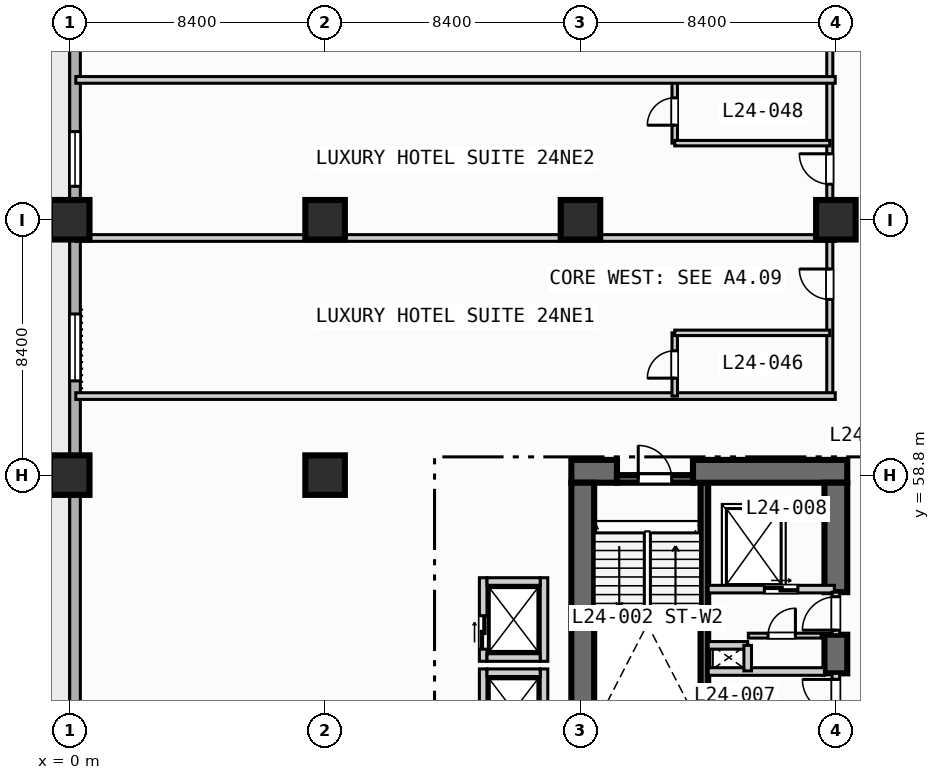
"""IFC4 building model, lengths in metres.
Left out: names, types, materials, properties, quantities, classifications, styles, units other than length and angle.
Written with IfcOpenShell. Run it as: python <this file> out.ifc"""

import sys

from ifc_helpers import new_model, si_unit, direction, frame, frame_2d, origin, origin_2d, place, context, subcontext, project, spatial, rectangle, extrude, element, fill, save


model = new_model("IFC4")
c1 = context("Model", 3, precision=1e-05, world=origin(), true_north=direction((0.0, 1.0)))
c2 = subcontext(c1, "Body", "Model", "MODEL_VIEW")
j1 = project(units=[si_unit("LENGTHUNIT", "METRE"), si_unit("PLANEANGLEUNIT", "RADIAN")], contexts=[c1])
p1 = place(None, origin())
s1 = spatial("IfcSite", under=j1, at=p1, CompositionType="ELEMENT")
p2 = place(p1, origin())
s2 = spatial("IfcBuilding", under=s1, at=p2, CompositionType="ELEMENT")
p3 = place(p2, frame((0.0, 0.0, 103.8)))
s3 = spatial("IfcBuildingStorey", under=s2, at=p3, CompositionType="ELEMENT", Elevation=103.8)
p4 = place(p3, frame((20.875, 50.5, 0.0), z_axis=(0.0, 0.0, 1.0), x_axis=(0.0, 1.0, 0.0)))
e1 = element("IfcWall", 1, at=p4, inside=s3, PredefinedType="SOLIDWALL", context=c2, shape_type="SweptSolid", body=[
    extrude(rectangle(XDim=8.05, YDim=0.25, at=frame_2d((4.025, 0.0))), origin(), (0.0, 0.0, 1.0), 3.55),
])
p5 = place(p3, frame((16.5, 58.925, 0.0), z_axis=(0.0, 0.0, 1.0), x_axis=(1.0, 0.0, 0.0)))
e2 = element("IfcWall", 2, at=p5, inside=s3, PredefinedType="SHEAR", context=c2, shape_type="SweptSolid", body=[
    extrude(rectangle(XDim=1.5, YDim=0.75, at=frame_2d((0.75, 0.0))), origin(), (0.0, 0.0, 1.0), 3.55),
])
p6 = place(p3, frame((20.5, 58.925, 0.0), z_axis=(0.0, 0.0, 1.0), x_axis=(1.0, 0.0, 0.0)))
e3 = element("IfcWall", 3, at=p6, inside=s3, PredefinedType="SHEAR", context=c2, shape_type="SweptSolid", body=[
    extrude(rectangle(XDim=5.075, YDim=0.75, at=frame_2d((2.538, 0.0))), origin(), (0.0, 0.0, 1.0), 3.55),
])
p7 = place(p3, frame((16.875, 42.2, 0.0), z_axis=(0.0, 0.0, 1.0), x_axis=(0.0, 1.0, 0.0)))
e4 = element("IfcWall", 4, at=p7, inside=s3, PredefinedType="SHEAR", context=c2, shape_type="SweptSolid", body=[
    extrude(rectangle(XDim=16.35, YDim=0.75, at=frame_2d((8.175, 0.0))), origin(), (0.0, 0.0, 1.0), 3.55),
])
p8 = place(p3, frame((25.2, 52.28, 0.0), z_axis=(0.0, 0.0, 1.0), x_axis=(0.0, 1.0, 0.0)))
e5 = element("IfcWall", 5, at=p8, inside=s3, PredefinedType="SHEAR", context=c2, shape_type="SweptSolid", body=[
    extrude(rectangle(XDim=1.27, YDim=0.75, at=frame_2d((0.635, 0.0))), origin(), (0.0, 0.0, 1.0), 3.55),
])
p9 = place(p3, frame((25.2, 54.95, 0.0), z_axis=(0.0, 0.0, 1.0), x_axis=(0.0, 1.0, 0.0)))
e6 = element("IfcWall", 6, at=p9, inside=s3, PredefinedType="SHEAR", context=c2, shape_type="SweptSolid", body=[
    extrude(rectangle(XDim=3.6, YDim=0.75, at=frame_2d((1.8, 0.0))), origin(), (0.0, 0.0, 1.0), 3.55),
])
for number, where, z_axis, x_axis in (
    (7, (0.0, 58.8, 0.0), (0.0, 0.0, 1.0), (1.0, 0.0, 0.0)),
    (8, (0.0, 67.2, 0.0), (0.0, 0.0, 1.0), (1.0, 0.0, 0.0)),
    (9, (8.4, 58.8, 0.0), (0.0, 0.0, 1.0), (1.0, 0.0, 0.0)),
    (10, (8.4, 67.2, 0.0), (0.0, 0.0, 1.0), (1.0, 0.0, 0.0)),
    (11, (16.8, 67.2, 0.0), (0.0, 0.0, 1.0), (1.0, 0.0, 0.0)),
    (12, (25.2, 67.2, 0.0), (0.0, 0.0, 1.0), (1.0, 0.0, 0.0)),
):
    element("IfcColumn", number, at=place(p3, frame(where, z_axis=z_axis, x_axis=x_axis)), inside=s3, PredefinedType="COLUMN", context=c2, shape_type="SweptSolid", body=[
        extrude(rectangle(XDim=1.3, YDim=1.3, at=origin_2d()), origin(), (0.0, 0.0, 1.0), 3.8),
    ])
p10 = place(p3, frame((0.175, 3.175, 0.0), z_axis=(0.0, 0.0, 1.0), x_axis=(0.0, 1.0, 0.0)))
e13 = element("IfcWall", 13, at=p10, inside=s3, PredefinedType="STANDARD", context=c2, shape_type="SweptSolid", body=[
    extrude(rectangle(XDim=86.05, YDim=0.35, at=frame_2d((43.025, 0.0))), origin(), (0.0, 0.0, 1.0), 3.55),
])
p11 = place(p10, frame((42.325, 0.0, 0.0)))
e14 = element("IfcOpeningElement", 14, at=p11, cuts=e13, PredefinedType="OPENING", context=c2, shape_type="SweptSolid", body=[
    extrude(rectangle(XDim=1.4, YDim=2.2, at=frame_2d((0.7, 1.1))), frame((0.0, 0.185, 0.0), z_axis=(0.0, -1.0, 0.0), x_axis=(1.0, 0.0, 0.0)), (0.0, 0.0, 1.0), 0.37),
])
p12 = place(p10, frame((25.125, 0.0, 0.85)))
e15 = element("IfcOpeningElement", 15, at=p12, cuts=e13, PredefinedType="OPENING", context=c2, shape_type="SweptSolid", body=[
    extrude(rectangle(XDim=2.2, YDim=1.8, at=frame_2d((1.1, 0.9))), frame((0.0, 0.185, 0.0), z_axis=(0.0, -1.0, 0.0), x_axis=(1.0, 0.0, 0.0)), (0.0, 0.0, 1.0), 0.37),
])
p13 = place(p10, frame((33.525, 0.0, 0.85)))
e16 = element("IfcOpeningElement", 16, at=p13, cuts=e13, PredefinedType="OPENING", context=c2, shape_type="SweptSolid", body=[
    extrude(rectangle(XDim=2.2, YDim=1.8, at=frame_2d((1.1, 0.9))), frame((0.0, 0.185, 0.0), z_axis=(0.0, -1.0, 0.0), x_axis=(1.0, 0.0, 0.0)), (0.0, 0.0, 1.0), 0.37),
])
p14 = place(p10, frame((58.725, 0.0, 0.85)))
e17 = element("IfcOpeningElement", 17, at=p14, cuts=e13, PredefinedType="OPENING", context=c2, shape_type="SweptSolid", body=[
    extrude(rectangle(XDim=2.2, YDim=1.8, at=frame_2d((1.1, 0.9))), frame((0.0, 0.185, 0.0), z_axis=(0.0, -1.0, 0.0), x_axis=(1.0, 0.0, 0.0)), (0.0, 0.0, 1.0), 0.37),
])
p15 = place(p10, frame((65.125, 0.0, 0.85)))
e18 = element("IfcOpeningElement", 18, at=p15, cuts=e13, PredefinedType="OPENING", context=c2, shape_type="SweptSolid", body=[
    extrude(rectangle(XDim=1.8, YDim=1.8, at=frame_2d((0.9, 0.9))), frame((0.0, 0.185, 0.0), z_axis=(0.0, -1.0, 0.0), x_axis=(1.0, 0.0, 0.0)), (0.0, 0.0, 1.0), 0.37),
])
p16 = place(p10, frame((73.275, 0.0, 0.85)))
e19 = element("IfcOpeningElement", 19, at=p16, cuts=e13, PredefinedType="OPENING", context=c2, shape_type="SweptSolid", body=[
    extrude(rectangle(XDim=1.8, YDim=1.8, at=frame_2d((0.9, 0.9))), frame((0.0, 0.185, 0.0), z_axis=(0.0, -1.0, 0.0), x_axis=(1.0, 0.0, 0.0)), (0.0, 0.0, 1.0), 0.37),
])
p17 = place(p10, frame((81.625, 0.0, 0.85)))
e20 = element("IfcOpeningElement", 20, at=p17, cuts=e13, PredefinedType="OPENING", context=c2, shape_type="SweptSolid", body=[
    extrude(rectangle(XDim=1.8, YDim=1.8, at=frame_2d((0.9, 0.9))), frame((0.0, 0.185, 0.0), z_axis=(0.0, -1.0, 0.0), x_axis=(1.0, 0.0, 0.0)), (0.0, 0.0, 1.0), 0.37),
])
p18 = place(p3, frame((18.0, 58.675, 0.0), z_axis=(0.0, 0.0, 1.0), x_axis=(1.0, 0.0, 0.0)))
e21 = element("IfcWall", 21, at=p18, inside=s3, PredefinedType="SOLIDWALL", context=c2, shape_type="SweptSolid", body=[
    extrude(rectangle(XDim=2.5, YDim=0.25, at=frame_2d((1.25, 0.0))), origin(), (0.0, 0.0, 1.0), 3.55),
])
p19 = place(p18, frame((0.7, 0.0, 0.0)))
e22 = element("IfcOpeningElement", 22, at=p19, cuts=e21, PredefinedType="OPENING", context=c2, shape_type="SweptSolid", body=[
    extrude(rectangle(XDim=1.1, YDim=2.15, at=frame_2d((0.55, 1.075))), frame((0.0, 0.135, 0.0), z_axis=(0.0, -1.0, 0.0), x_axis=(1.0, 0.0, 0.0)), (0.0, 0.0, 1.0), 0.27),
])
p20 = place(p3, frame((25.2, 50.8, 0.0), z_axis=(0.0, 0.0, 1.0), x_axis=(0.0, 1.0, 0.0)))
e23 = element("IfcWall", 23, at=p20, inside=s3, PredefinedType="SOLIDWALL", context=c2, shape_type="SweptSolid", body=[
    extrude(rectangle(XDim=1.48, YDim=0.25, at=frame_2d((0.74, 0.0))), origin(), (0.0, 0.0, 1.0), 3.55),
])
p21 = place(p20, frame((0.18, 0.0, 0.0)))
e24 = element("IfcOpeningElement", 24, at=p21, cuts=e23, PredefinedType="OPENING", context=c2, shape_type="SweptSolid", body=[
    extrude(rectangle(XDim=1.1, YDim=2.15, at=frame_2d((0.55, 1.075))), frame((0.0, 0.135, 0.0), z_axis=(0.0, -1.0, 0.0), x_axis=(1.0, 0.0, 0.0)), (0.0, 0.0, 1.0), 0.27),
])
p22 = place(p3, frame((21.0, 52.34, 0.0), z_axis=(0.0, 0.0, 1.0), x_axis=(1.0, 0.0, 0.0)))
e25 = element("IfcWall", 25, at=p22, inside=s3, PredefinedType="SOLIDWALL", context=c2, shape_type="SweptSolid", body=[
    extrude(rectangle(XDim=3.825, YDim=0.25, at=frame_2d((1.913, 0.0))), origin(), (0.0, 0.0, 1.0), 3.55),
])
p23 = place(p3, frame((21.0, 55.05, 0.0), z_axis=(0.0, 0.0, 1.0), x_axis=(1.0, 0.0, 0.0)))
e26 = element("IfcWall", 26, at=p23, inside=s3, PredefinedType="SOLIDWALL", context=c2, shape_type="SweptSolid", body=[
    extrude(rectangle(XDim=4.15, YDim=0.25, at=frame_2d((2.075, 0.0))), origin(), (0.0, 0.0, 1.0), 3.55),
])
p24 = place(p23, frame((1.85, 0.0, 0.0)))
e27 = element("IfcOpeningElement", 27, at=p24, cuts=e26, PredefinedType="OPENING", context=c2, shape_type="SweptSolid", body=[
    extrude(rectangle(XDim=1.1, YDim=2.15, at=frame_2d((0.55, 1.075))), frame((0.0, 0.135, 0.0), z_axis=(0.0, -1.0, 0.0), x_axis=(1.0, 0.0, 0.0)), (0.0, 0.0, 1.0), 0.27),
])
p25 = place(p3, frame((25.2, 53.55, 0.0), z_axis=(0.0, 0.0, 1.0), x_axis=(0.0, 1.0, 0.0)))
e28 = element("IfcWall", 28, at=p25, inside=s3, PredefinedType="SOLIDWALL", context=c2, shape_type="SweptSolid", body=[
    extrude(rectangle(XDim=1.4, YDim=0.25, at=frame_2d((0.7, 0.0))), origin(), (0.0, 0.0, 1.0), 3.55),
])
p26 = place(p25, frame((0.15, 0.0, 0.0)))
e29 = element("IfcOpeningElement", 29, at=p26, cuts=e28, PredefinedType="OPENING", context=c2, shape_type="SweptSolid", body=[
    extrude(rectangle(XDim=1.1, YDim=2.15, at=frame_2d((0.55, 1.075))), frame((0.0, 0.135, 0.0), z_axis=(0.0, -1.0, 0.0), x_axis=(1.0, 0.0, 0.0)), (0.0, 0.0, 1.0), 0.27),
])
p27 = place(p3, frame((21.0, 53.2, 0.0), z_axis=(0.0, 0.0, 1.0), x_axis=(1.0, 0.0, 0.0)))
e30 = element("IfcWall", 30, at=p27, inside=s3, PredefinedType="SOLIDWALL", context=c2, shape_type="SweptSolid", body=[
    extrude(rectangle(XDim=1.3, YDim=0.25, at=frame_2d((0.65, 0.0))), origin(), (0.0, 0.0, 1.0), 3.55),
])
p28 = place(p3, frame((22.3, 52.36, 0.0), z_axis=(0.0, 0.0, 1.0), x_axis=(0.0, 1.0, 0.0)))
e31 = element("IfcWall", 31, at=p28, inside=s3, PredefinedType="SOLIDWALL", context=c2, shape_type="SweptSolid", body=[
    extrude(rectangle(XDim=0.84, YDim=0.25, at=frame_2d((0.42, 0.0))), origin(), (0.0, 0.0, 1.0), 3.55),
])
p29 = place(p3, frame((22.32, 53.52, 0.0), z_axis=(0.0, 0.0, 1.0), x_axis=(1.0, 0.0, 0.0)))
e32 = element("IfcWall", 32, at=p29, inside=s3, PredefinedType="PARTITIONING", context=c2, shape_type="SweptSolid", body=[
    extrude(rectangle(XDim=2.4, YDim=0.16, at=frame_2d((1.2, 0.0))), origin(), (0.0, 0.0, 1.0), 3.55),
])
p30 = place(p29, frame((0.65, 0.0, 0.0)))
e33 = element("IfcOpeningElement", 33, at=p30, cuts=e32, PredefinedType="OPENING", context=c2, shape_type="SweptSolid", body=[
    extrude(rectangle(XDim=0.9, YDim=2.1, at=frame_2d((0.45, 1.05))), frame((0.0, 0.09, 0.0), z_axis=(0.0, -1.0, 0.0), x_axis=(1.0, 0.0, 0.0)), (0.0, 0.0, 1.0), 0.18),
])
p31 = place(p3, frame((13.6, 49.675, 0.0), z_axis=(0.0, 0.0, 1.0), x_axis=(0.0, 1.0, 0.0)))
e34 = element("IfcWall", 34, at=p31, inside=s3, PredefinedType="SOLIDWALL", context=c2, shape_type="SweptSolid", body=[
    extrude(rectangle(XDim=2.75, YDim=0.25, at=frame_2d((1.375, 0.0))), origin(), (0.0, 0.0, 1.0), 3.55),
])
p32 = place(p31, frame((0.4, 0.0, 0.0)))
e35 = element("IfcOpeningElement", 35, at=p32, cuts=e34, PredefinedType="OPENING", context=c2, shape_type="SweptSolid", body=[
    extrude(rectangle(XDim=1.1, YDim=2.15, at=frame_2d((0.55, 1.075))), frame((0.0, 0.135, 0.0), z_axis=(0.0, -1.0, 0.0), x_axis=(1.0, 0.0, 0.0)), (0.0, 0.0, 1.0), 0.27),
])
p33 = place(p3, frame((15.6, 49.675, 0.0), z_axis=(0.0, 0.0, 1.0), x_axis=(0.0, 1.0, 0.0)))
e36 = element("IfcWall", 36, at=p33, inside=s3, PredefinedType="SOLIDWALL", context=c2, shape_type="SweptSolid", body=[
    extrude(rectangle(XDim=2.75, YDim=0.25, at=frame_2d((1.375, 0.0))), origin(), (0.0, 0.0, 1.0), 3.55),
])
p34 = place(p3, frame((13.725, 52.3, 0.0), z_axis=(0.0, 0.0, 1.0), x_axis=(1.0, 0.0, 0.0)))
e37 = element("IfcWall", 37, at=p34, inside=s3, PredefinedType="SOLIDWALL", context=c2, shape_type="SweptSolid", body=[
    extrude(rectangle(XDim=1.75, YDim=0.25, at=frame_2d((0.875, 0.0))), origin(), (0.0, 0.0, 1.0), 3.55),
])
p35 = place(p3, frame((13.6, 52.675, 0.0), z_axis=(0.0, 0.0, 1.0), x_axis=(0.0, 1.0, 0.0)))
e38 = element("IfcWall", 38, at=p35, inside=s3, PredefinedType="SOLIDWALL", context=c2, shape_type="SweptSolid", body=[
    extrude(rectangle(XDim=2.75, YDim=0.25, at=frame_2d((1.375, 0.0))), origin(), (0.0, 0.0, 1.0), 3.55),
])
p36 = place(p35, frame((0.4, 0.0, 0.0)))
e39 = element("IfcOpeningElement", 39, at=p36, cuts=e38, PredefinedType="OPENING", context=c2, shape_type="SweptSolid", body=[
    extrude(rectangle(XDim=1.1, YDim=2.15, at=frame_2d((0.55, 1.075))), frame((0.0, 0.135, 0.0), z_axis=(0.0, -1.0, 0.0), x_axis=(1.0, 0.0, 0.0)), (0.0, 0.0, 1.0), 0.27),
])
p37 = place(p3, frame((15.6, 52.675, 0.0), z_axis=(0.0, 0.0, 1.0), x_axis=(0.0, 1.0, 0.0)))
e40 = element("IfcWall", 40, at=p37, inside=s3, PredefinedType="SOLIDWALL", context=c2, shape_type="SweptSolid", body=[
    extrude(rectangle(XDim=2.75, YDim=0.25, at=frame_2d((1.375, 0.0))), origin(), (0.0, 0.0, 1.0), 3.55),
])
for number, where, z_axis, x_axis in (
    (41, (13.725, 52.8, 0.0), (0.0, 0.0, 1.0), (1.0, 0.0, 0.0)),
    (42, (13.725, 55.3, 0.0), (0.0, 0.0, 1.0), (1.0, 0.0, 0.0)),
):
    element("IfcWall", number, at=place(p3, frame(where, z_axis=z_axis, x_axis=x_axis)), inside=s3, PredefinedType="SOLIDWALL", context=c2, shape_type="SweptSolid", body=[
        extrude(rectangle(XDim=1.75, YDim=0.25, at=frame_2d((0.875, 0.0))), origin(), (0.0, 0.0, 1.0), 3.55),
    ])
p38 = place(p3, frame((25.0, 61.4, 0.0), z_axis=(0.0, 0.0, 1.0), x_axis=(0.0, 1.0, 0.0)))
e43 = element("IfcWall", 43, at=p38, inside=s3, PredefinedType="PARTITIONING", context=c2, shape_type="SweptSolid", body=[
    extrude(rectangle(XDim=27.6, YDim=0.2, at=frame_2d((13.8, 0.0))), origin(), (0.0, 0.0, 1.0), 2.8),
])
p39 = place(p38, frame((3.18, 0.0, 0.0)))
e44 = element("IfcOpeningElement", 44, at=p39, cuts=e43, PredefinedType="OPENING", context=c2, shape_type="SweptSolid", body=[
    extrude(rectangle(XDim=1.0, YDim=2.15, at=frame_2d((0.5, 1.075))), frame((0.0, 0.11, 0.0), z_axis=(0.0, -1.0, 0.0), x_axis=(1.0, 0.0, 0.0)), (0.0, 0.0, 1.0), 0.22),
])
p40 = place(p38, frame((6.97, 0.0, 0.0)))
e45 = element("IfcOpeningElement", 45, at=p40, cuts=e43, PredefinedType="OPENING", context=c2, shape_type="SweptSolid", body=[
    extrude(rectangle(XDim=1.0, YDim=2.15, at=frame_2d((0.5, 1.075))), frame((0.0, 0.11, 0.0), z_axis=(0.0, -1.0, 0.0), x_axis=(1.0, 0.0, 0.0)), (0.0, 0.0, 1.0), 0.22),
])
p41 = place(p38, frame((12.035, 0.0, 0.0)))
e46 = element("IfcOpeningElement", 46, at=p41, cuts=e43, PredefinedType="OPENING", context=c2, shape_type="SweptSolid", body=[
    extrude(rectangle(XDim=1.0, YDim=2.15, at=frame_2d((0.5, 1.075))), frame((0.0, 0.11, 0.0), z_axis=(0.0, -1.0, 0.0), x_axis=(1.0, 0.0, 0.0)), (0.0, 0.0, 1.0), 0.22),
])
p42 = place(p38, frame((20.385, 0.0, 0.0)))
e47 = element("IfcOpeningElement", 47, at=p42, cuts=e43, PredefinedType="OPENING", context=c2, shape_type="SweptSolid", body=[
    extrude(rectangle(XDim=1.0, YDim=2.15, at=frame_2d((0.5, 1.075))), frame((0.0, 0.11, 0.0), z_axis=(0.0, -1.0, 0.0), x_axis=(1.0, 0.0, 0.0)), (0.0, 0.0, 1.0), 0.22),
])
p43 = place(p3, frame((0.2, 61.4, 0.0), z_axis=(0.0, 0.0, 1.0), x_axis=(1.0, 0.0, 0.0)))
e48 = element("IfcWall", 48, at=p43, inside=s3, PredefinedType="PARTITIONING", context=c2, shape_type="SweptSolid", body=[
    extrude(rectangle(XDim=24.98, YDim=0.22, at=frame_2d((12.49, 0.0))), origin(), (0.0, 0.0, 1.0), 3.55),
])
p44 = place(p3, frame((19.9, 61.4, 0.0), z_axis=(0.0, 0.0, 1.0), x_axis=(0.0, 1.0, 0.0)))
e49 = element("IfcWall", 49, at=p44, inside=s3, PredefinedType="PLUMBINGWALL", context=c2, shape_type="SweptSolid", body=[
    extrude(rectangle(XDim=2.08, YDim=0.18, at=frame_2d((1.04, 0.0))), origin(), (0.0, 0.0, 1.0), 3.55),
])
p45 = place(p44, frame((0.59, 0.0, 0.0)))
e50 = element("IfcOpeningElement", 50, at=p45, cuts=e49, PredefinedType="OPENING", context=c2, shape_type="SweptSolid", body=[
    extrude(rectangle(XDim=0.9, YDim=2.1, at=frame_2d((0.45, 1.05))), frame((0.0, 0.1, 0.0), z_axis=(0.0, -1.0, 0.0), x_axis=(1.0, 0.0, 0.0)), (0.0, 0.0, 1.0), 0.2),
])
p46 = place(p3, frame((19.9, 63.48, 0.0), z_axis=(0.0, 0.0, 1.0), x_axis=(1.0, 0.0, 0.0)))
e51 = element("IfcWall", 51, at=p46, inside=s3, PredefinedType="PLUMBINGWALL", context=c2, shape_type="SweptSolid", body=[
    extrude(rectangle(XDim=5.1, YDim=0.18, at=frame_2d((2.55, 0.0))), origin(), (0.0, 0.0, 1.0), 3.55),
])
p47 = place(p3, frame((0.2, 66.6, 0.0), z_axis=(0.0, 0.0, 1.0), x_axis=(1.0, 0.0, 0.0)))
e52 = element("IfcWall", 52, at=p47, inside=s3, PredefinedType="PARTITIONING", context=c2, shape_type="SweptSolid", body=[
    extrude(rectangle(XDim=24.98, YDim=0.22, at=frame_2d((12.49, 0.0))), origin(), (0.0, 0.0, 1.0), 3.55),
])
p48 = place(p3, frame((19.9, 69.72, 0.0), z_axis=(0.0, 0.0, 1.0), x_axis=(0.0, 1.0, 0.0)))
e53 = element("IfcWall", 53, at=p48, inside=s3, PredefinedType="PLUMBINGWALL", context=c2, shape_type="SweptSolid", body=[
    extrude(rectangle(XDim=2.08, YDim=0.18, at=frame_2d((1.04, 0.0))), origin(), (0.0, 0.0, 1.0), 3.55),
])
p49 = place(p48, frame((0.59, 0.0, 0.0)))
e54 = element("IfcOpeningElement", 54, at=p49, cuts=e53, PredefinedType="OPENING", context=c2, shape_type="SweptSolid", body=[
    extrude(rectangle(XDim=0.9, YDim=2.1, at=frame_2d((0.45, 1.05))), frame((0.0, 0.1, 0.0), z_axis=(0.0, -1.0, 0.0), x_axis=(1.0, 0.0, 0.0)), (0.0, 0.0, 1.0), 0.2),
])
p50 = place(p3, frame((19.9, 69.72, 0.0), z_axis=(0.0, 0.0, 1.0), x_axis=(1.0, 0.0, 0.0)))
e55 = element("IfcWall", 55, at=p50, inside=s3, PredefinedType="PLUMBINGWALL", context=c2, shape_type="SweptSolid", body=[
    extrude(rectangle(XDim=5.1, YDim=0.18, at=frame_2d((2.55, 0.0))), origin(), (0.0, 0.0, 1.0), 3.55),
])
p51 = place(p3, frame((0.2, 71.8, 0.0), z_axis=(0.0, 0.0, 1.0), x_axis=(1.0, 0.0, 0.0)))
e56 = element("IfcWall", 56, at=p51, inside=s3, PredefinedType="PARTITIONING", context=c2, shape_type="SweptSolid", body=[
    extrude(rectangle(XDim=24.98, YDim=0.22, at=frame_2d((12.49, 0.0))), origin(), (0.0, 0.0, 1.0), 3.55),
])
p52 = place(p14, origin())
e57 = element("IfcWindow", 57, at=p52, inside=s3, PartitioningType="SINGLE_PANEL", PredefinedType="WINDOW", context=c2, shape_type="SweptSolid", body=[
    extrude(rectangle(XDim=2.2, YDim=1.8, at=frame_2d((1.1, 0.9))), frame((0.0, 0.03, 0.0), z_axis=(0.0, -1.0, 0.0), x_axis=(1.0, 0.0, 0.0)), (0.0, 0.0, 1.0), 0.06),
])
fill(e17, e57)
p53 = place(p15, origin())
e58 = element("IfcWindow", 58, at=p53, inside=s3, PartitioningType="SINGLE_PANEL", PredefinedType="WINDOW", context=c2, shape_type="SweptSolid", body=[
    extrude(rectangle(XDim=1.8, YDim=1.8, at=frame_2d((0.9, 0.9))), frame((0.0, 0.03, 0.0), z_axis=(0.0, -1.0, 0.0), x_axis=(1.0, 0.0, 0.0)), (0.0, 0.0, 1.0), 0.06),
])
fill(e18, e58)
p54 = place(p19, origin())
e59 = element("IfcDoor", 59, at=p54, inside=s3, OperationType="SINGLE_SWING_LEFT", PredefinedType="DOOR", context=c2, shape_type="SweptSolid", body=[
    extrude(rectangle(XDim=1.1, YDim=2.15, at=frame_2d((0.55, 1.075))), frame((0.0, 0.025, 0.0), z_axis=(0.0, -1.0, 0.0), x_axis=(1.0, 0.0, 0.0)), (0.0, 0.0, 1.0), 0.05),
])
fill(e22, e59)
p55 = place(p21, origin())
e60 = element("IfcDoor", 60, at=p55, inside=s3, OperationType="SINGLE_SWING_RIGHT", PredefinedType="DOOR", context=c2, shape_type="SweptSolid", body=[
    extrude(rectangle(XDim=1.1, YDim=2.15, at=frame_2d((0.55, 1.075))), frame((0.0, 0.025, 0.0), z_axis=(0.0, -1.0, 0.0), x_axis=(1.0, 0.0, 0.0)), (0.0, 0.0, 1.0), 0.05),
])
fill(e24, e60)
p56 = place(p24, origin())
e61 = element("IfcDoor", 61, at=p56, inside=s3, OperationType="SLIDING_TO_LEFT", PredefinedType="DOOR", context=c2, shape_type="SweptSolid", body=[
    extrude(rectangle(XDim=1.1, YDim=2.15, at=frame_2d((0.55, 1.075))), frame((0.0, 0.025, 0.0), z_axis=(0.0, -1.0, 0.0), x_axis=(1.0, 0.0, 0.0)), (0.0, 0.0, 1.0), 0.05),
])
fill(e27, e61)
p57 = place(p26, origin())
e62 = element("IfcDoor", 62, at=p57, inside=s3, OperationType="SINGLE_SWING_LEFT", PredefinedType="DOOR", context=c2, shape_type="SweptSolid", body=[
    extrude(rectangle(XDim=1.1, YDim=2.15, at=frame_2d((0.55, 1.075))), frame((0.0, 0.025, 0.0), z_axis=(0.0, -1.0, 0.0), x_axis=(1.0, 0.0, 0.0)), (0.0, 0.0, 1.0), 0.05),
])
fill(e29, e62)
p58 = place(p30, origin())
e63 = element("IfcDoor", 63, at=p58, inside=s3, OperationType="SINGLE_SWING_RIGHT", PredefinedType="DOOR", context=c2, shape_type="SweptSolid", body=[
    extrude(rectangle(XDim=0.9, YDim=2.1, at=frame_2d((0.45, 1.05))), frame((0.0, 0.025, 0.0), z_axis=(0.0, -1.0, 0.0), x_axis=(1.0, 0.0, 0.0)), (0.0, 0.0, 1.0), 0.05),
])
fill(e33, e63)
p59 = place(p36, origin())
e64 = element("IfcDoor", 64, at=p59, inside=s3, OperationType="SLIDING_TO_LEFT", PredefinedType="DOOR", context=c2, shape_type="SweptSolid", body=[
    extrude(rectangle(XDim=1.1, YDim=2.15, at=frame_2d((0.55, 1.075))), frame((0.0, 0.025, 0.0), z_axis=(0.0, -1.0, 0.0), x_axis=(1.0, 0.0, 0.0)), (0.0, 0.0, 1.0), 0.05),
])
fill(e39, e64)
p60 = place(p39, origin())
e65 = element("IfcDoor", 65, at=p60, inside=s3, OperationType="SINGLE_SWING_RIGHT", PredefinedType="DOOR", context=c2, shape_type="SweptSolid", body=[
    extrude(rectangle(XDim=1.0, YDim=2.15, at=frame_2d((0.5, 1.075))), frame((0.0, 0.025, 0.0), z_axis=(0.0, -1.0, 0.0), x_axis=(1.0, 0.0, 0.0)), (0.0, 0.0, 1.0), 0.05),
])
fill(e44, e65)
p61 = place(p40, origin())
e66 = element("IfcDoor", 66, at=p61, inside=s3, OperationType="SINGLE_SWING_RIGHT", PredefinedType="DOOR", context=c2, shape_type="SweptSolid", body=[
    extrude(rectangle(XDim=1.0, YDim=2.15, at=frame_2d((0.5, 1.075))), frame((0.0, 0.025, 0.0), z_axis=(0.0, -1.0, 0.0), x_axis=(1.0, 0.0, 0.0)), (0.0, 0.0, 1.0), 0.05),
])
fill(e45, e66)
p62 = place(p45, origin())
e67 = element("IfcDoor", 67, at=p62, inside=s3, OperationType="SINGLE_SWING_LEFT", PredefinedType="DOOR", context=c2, shape_type="SweptSolid", body=[
    extrude(rectangle(XDim=0.9, YDim=2.1, at=frame_2d((0.45, 1.05))), frame((0.0, 0.025, 0.0), z_axis=(0.0, -1.0, 0.0), x_axis=(1.0, 0.0, 0.0)), (0.0, 0.0, 1.0), 0.05),
])
fill(e50, e67)
p63 = place(p49, origin())
e68 = element("IfcDoor", 68, at=p63, inside=s3, OperationType="SINGLE_SWING_LEFT", PredefinedType="DOOR", context=c2, shape_type="SweptSolid", body=[
    extrude(rectangle(XDim=0.9, YDim=2.1, at=frame_2d((0.45, 1.05))), frame((0.0, 0.025, 0.0), z_axis=(0.0, -1.0, 0.0), x_axis=(1.0, 0.0, 0.0)), (0.0, 0.0, 1.0), 0.05),
])
fill(e54, e68)
save(model, sys.argv[1])
